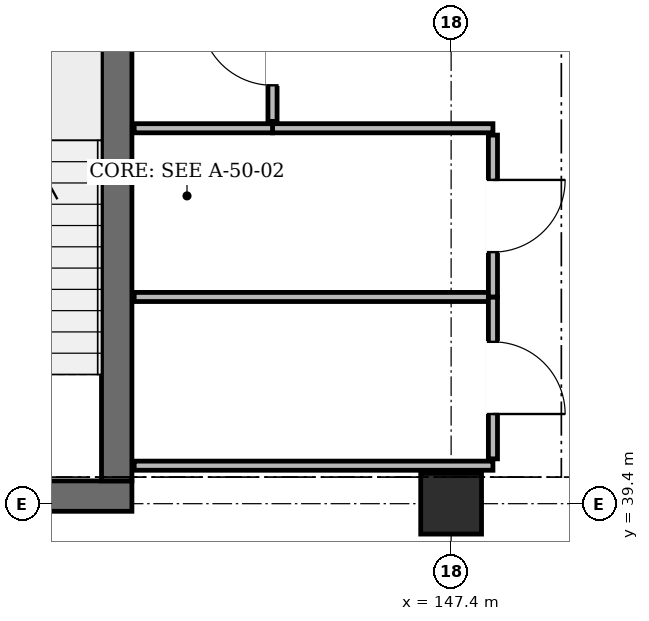
"""IFC4 building model, lengths in metres.
Left out: names, types, materials, properties, quantities, classifications, styles, units other than length and angle.
Written with IfcOpenShell. Run it as: python <this file> out.ifc"""

import sys

from ifc_helpers import new_model, si_unit, direction, frame, frame_2d, origin, origin_2d, place, context, subcontext, project, spatial, rectangle, extrude, element, fill, save


model = new_model("IFC4")
c1 = context("Model", 3, precision=1e-05, world=origin(), true_north=direction((0.0, 1.0)))
c2 = subcontext(c1, "Body", "Model", "MODEL_VIEW")
j1 = project(units=[si_unit("LENGTHUNIT", "METRE"), si_unit("PLANEANGLEUNIT", "RADIAN")], contexts=[c1])
p1 = place(None, origin())
s1 = spatial("IfcSite", under=j1, at=p1, CompositionType="ELEMENT")
p2 = place(p1, origin())
s2 = spatial("IfcBuilding", under=s1, at=p2, CompositionType="ELEMENT")
p3 = place(p2, frame((0.0, 0.0, 32.4)))
s3 = spatial("IfcBuildingStorey", under=s2, at=p3, CompositionType="ELEMENT", Elevation=32.4)
p4 = place(p3, frame((147.4, 39.4, 0.0), z_axis=(0.0, 0.0, 1.0), x_axis=(1.0, 0.0, 0.0)))
e1 = element("IfcColumn", 1, at=p4, inside=s3, PredefinedType="COLUMN", context=c2, shape_type="SweptSolid", body=[
    extrude(rectangle(XDim=0.8, YDim=0.8, at=origin_2d()), origin(), (0.0, 0.0, 1.0), 3.89),
])
p5 = place(p3, frame((139.4, 39.5, 0.0), z_axis=(0.0, 0.0, 1.0), x_axis=(1.0, 0.0, 0.0)))
e2 = element("IfcWall", 2, at=p5, inside=s3, PredefinedType="SHEAR", context=c2, shape_type="SweptSolid", body=[
    extrude(rectangle(XDim=3.8, YDim=0.4, at=frame_2d((1.9, 0.0))), origin(), (0.0, 0.0, 1.0), 3.89),
])
p6 = place(p5, frame((1.3, 0.0, 0.0)))
e3 = element("IfcOpeningElement", 3, at=p6, cuts=e2, PredefinedType="OPENING", context=c2, shape_type="SweptSolid", body=[
    extrude(rectangle(XDim=1.2, YDim=2.2, at=frame_2d((0.6, 1.1))), frame((0.0, 0.212, 0.0), z_axis=(0.0, -1.0, 0.0), x_axis=(1.0, 0.0, 0.0)), (0.0, 0.0, 1.0), 0.424),
])
p7 = place(p3, frame((143.0, 39.7, 0.0), z_axis=(0.0, 0.0, 1.0), x_axis=(0.0, 1.0, 0.0)))
e4 = element("IfcWall", 4, at=p7, inside=s3, PredefinedType="SHEAR", context=c2, shape_type="SweptSolid", body=[
    extrude(rectangle(XDim=7.0, YDim=0.4, at=frame_2d((3.5, 0.0))), origin(), (0.0, 0.0, 1.0), 3.89),
])
p8 = place(p3, frame((143.23, 39.9, 0.0), z_axis=(0.0, 0.0, 1.0), x_axis=(1.0, 0.0, 0.0)))
e5 = element("IfcWall", 5, at=p8, inside=s3, PredefinedType="PARTITIONING", context=c2, shape_type="SweptSolid", body=[
    extrude(rectangle(XDim=4.72, YDim=0.12, at=frame_2d((2.36, 0.0))), origin(), (0.0, 0.0, 1.0), 3.805),
])
p9 = place(p3, frame((145.05, 44.34, 0.0), z_axis=(0.0, 0.0, 1.0), x_axis=(1.0, 0.0, 0.0)))
e6 = element("IfcWall", 6, at=p9, inside=s3, PredefinedType="PARTITIONING", context=c2, shape_type="SweptSolid", body=[
    extrude(rectangle(XDim=2.9, YDim=0.12, at=frame_2d((1.45, 0.0))), origin(), (0.0, 0.0, 1.0), 3.315),
])
p10 = place(p3, frame((143.23, 42.12, 0.0), z_axis=(0.0, 0.0, 1.0), x_axis=(1.0, 0.0, 0.0)))
e7 = element("IfcWall", 7, at=p10, inside=s3, PredefinedType="PARTITIONING", context=c2, shape_type="SweptSolid", body=[
    extrude(rectangle(XDim=4.72, YDim=0.12, at=frame_2d((2.36, 0.0))), origin(), (0.0, 0.0, 1.0), 3.365),
])
p11 = place(p3, frame((147.95, 42.12, 0.0), z_axis=(0.0, 0.0, 1.0), x_axis=(0.0, -1.0, 0.0)))
e8 = element("IfcWall", 8, at=p11, inside=s3, PredefinedType="PARTITIONING", context=c2, shape_type="SweptSolid", body=[
    extrude(rectangle(XDim=2.13, YDim=0.12, at=frame_2d((1.065, 0.0))), origin(), (0.0, 0.0, 1.0), 3.805),
])
p12 = place(p11, frame((0.59, 0.0, 0.0)))
e9 = element("IfcOpeningElement", 9, at=p12, cuts=e8, PredefinedType="OPENING", context=c2, shape_type="SweptSolid", body=[
    extrude(rectangle(XDim=0.95, YDim=2.15, at=frame_2d((0.475, 1.075))), frame((0.0, 0.072, 0.0), z_axis=(0.0, -1.0, 0.0), x_axis=(1.0, 0.0, 0.0)), (0.0, 0.0, 1.0), 0.144),
])
p13 = place(p3, frame((143.23, 44.34, 0.0), z_axis=(0.0, 0.0, 1.0), x_axis=(1.0, 0.0, 0.0)))
e10 = element("IfcWall", 10, at=p13, inside=s3, PredefinedType="PARTITIONING", context=c2, shape_type="SweptSolid", body=[
    extrude(rectangle(XDim=1.82, YDim=0.12, at=frame_2d((0.91, 0.0))), origin(), (0.0, 0.0, 1.0), 3.805),
])
p14 = place(p3, frame((147.95, 44.25, 0.0), z_axis=(0.0, 0.0, 1.0), x_axis=(0.0, -1.0, 0.0)))
e11 = element("IfcWall", 11, at=p14, inside=s3, PredefinedType="PARTITIONING", context=c2, shape_type="SweptSolid", body=[
    extrude(rectangle(XDim=2.13, YDim=0.12, at=frame_2d((1.065, 0.0))), origin(), (0.0, 0.0, 1.0), 3.805),
])
p15 = place(p14, frame((0.59, 0.0, 0.0)))
e12 = element("IfcOpeningElement", 12, at=p15, cuts=e11, PredefinedType="OPENING", context=c2, shape_type="SweptSolid", body=[
    extrude(rectangle(XDim=0.95, YDim=2.15, at=frame_2d((0.475, 1.075))), frame((0.0, 0.072, 0.0), z_axis=(0.0, -1.0, 0.0), x_axis=(1.0, 0.0, 0.0)), (0.0, 0.0, 1.0), 0.144),
])
p16 = place(p3, frame((145.05, 46.33, 0.0), z_axis=(0.0, 0.0, 1.0), x_axis=(0.0, -1.0, 0.0)))
e13 = element("IfcWall", 13, at=p16, inside=s3, PredefinedType="PARTITIONING", context=c2, shape_type="SweptSolid", body=[
    extrude(rectangle(XDim=1.9, YDim=0.12, at=frame_2d((0.95, 0.0))), origin(), (0.0, 0.0, 1.0), 3.805),
])
p17 = place(p16, frame((0.475, 0.0, 0.0)))
e14 = element("IfcOpeningElement", 14, at=p17, cuts=e13, PredefinedType="OPENING", context=c2, shape_type="SweptSolid", body=[
    extrude(rectangle(XDim=0.95, YDim=2.15, at=frame_2d((0.475, 1.075))), frame((0.0, 0.072, 0.0), z_axis=(0.0, -1.0, 0.0), x_axis=(1.0, 0.0, 0.0)), (0.0, 0.0, 1.0), 0.144),
])
p18 = place(p12, origin())
e15 = element("IfcDoor", 15, at=p18, inside=s3, OperationType="SINGLE_SWING_RIGHT", PredefinedType="DOOR", context=c2, shape_type="SweptSolid", body=[
    extrude(rectangle(XDim=0.95, YDim=2.15, at=frame_2d((0.475, 1.075))), frame((0.0, 0.025, 0.0), z_axis=(0.0, -1.0, 0.0), x_axis=(1.0, 0.0, 0.0)), (0.0, 0.0, 1.0), 0.05),
])
fill(e9, e15)
p19 = place(p15, origin())
e16 = element("IfcDoor", 16, at=p19, inside=s3, OperationType="SINGLE_SWING_LEFT", PredefinedType="DOOR", context=c2, shape_type="SweptSolid", body=[
    extrude(rectangle(XDim=0.95, YDim=2.15, at=frame_2d((0.475, 1.075))), frame((0.0, 0.025, 0.0), z_axis=(0.0, -1.0, 0.0), x_axis=(1.0, 0.0, 0.0)), (0.0, 0.0, 1.0), 0.05),
])
fill(e12, e16)
p20 = place(p17, frame((0.95, 0.0, 0.0), z_axis=(0.0, 0.0, 1.0), x_axis=(-1.0, 0.0, 0.0)))
e17 = element("IfcDoor", 17, at=p20, inside=s3, OperationType="SINGLE_SWING_RIGHT", PredefinedType="DOOR", context=c2, shape_type="SweptSolid", body=[
    extrude(rectangle(XDim=0.95, YDim=2.15, at=frame_2d((0.475, 1.075))), frame((0.0, 0.025, 0.0), z_axis=(0.0, -1.0, 0.0), x_axis=(1.0, 0.0, 0.0)), (0.0, 0.0, 1.0), 0.05),
])
fill(e14, e17)
save(model, sys.argv[1])
